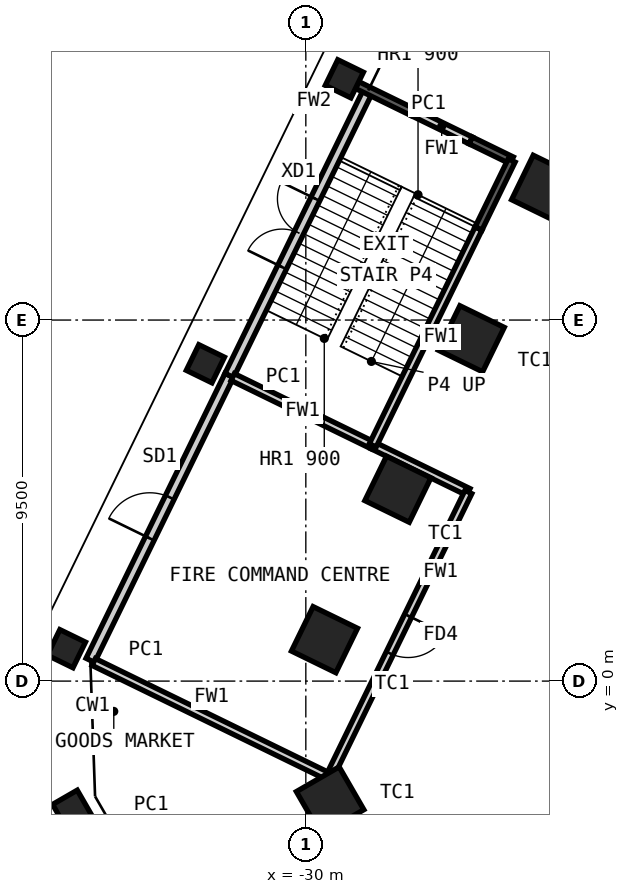
"""IFC4 building model, lengths in metres.
Left out: names, types, materials, properties, quantities, classifications, styles, units other than length and angle.
Written with IfcOpenShell. Run it as: python <this file> out.ifc"""

import sys

from ifc_helpers import new_model, si_unit, direction, frame, frame_2d, origin, origin_2d, place, context, subcontext, project, spatial, rectangle, hollow_rectangle, extrude, element, fill, save


model = new_model("IFC4")
c1 = context("Model", 3, precision=1e-05, world=origin(), true_north=direction((0.0, 1.0)))
c2 = subcontext(c1, "Body", "Model", "MODEL_VIEW")
j1 = project(units=[si_unit("LENGTHUNIT", "METRE"), si_unit("PLANEANGLEUNIT", "RADIAN")], contexts=[c1])
p1 = place(None, origin())
s1 = spatial("IfcSite", under=j1, at=p1, CompositionType="ELEMENT")
p2 = place(p1, origin())
s2 = spatial("IfcBuilding", under=s1, at=p2, CompositionType="ELEMENT")
p3 = place(p2, origin())
s3 = spatial("IfcBuildingStorey", under=s2, at=p3, CompositionType="ELEMENT", Elevation=0.0)
for number, where, z_axis, x_axis in (
    (1, (-29.361, -3.146, 0.0), (0.0, 0.0, 1.0), (0.5, -0.866, 0.0)),
    (2, (-29.509, 1.09, 0.0), (0.0, 0.0, 1.0), (-0.438, -0.899, 0.0)),
    (3, (-27.578, 5.049, 0.0), (0.0, 0.0, 1.0), (-0.438, -0.899, 0.0)),
    (4, (-25.647, 9.008, 0.0), (0.0, 0.0, 1.0), (-0.438, -0.899, 0.0)),
    (5, (-23.716, 12.966, 0.0), (0.0, 0.0, 1.0), (-0.438, -0.899, 0.0)),
):
    element("IfcColumn", number, at=place(p3, frame(where, z_axis=z_axis, x_axis=x_axis)), inside=s3, PredefinedType="COLUMN", context=c2, shape_type="SweptSolid", body=[
        extrude(hollow_rectangle(XDim=1.3, YDim=1.3, WallThickness=0.1, at=origin_2d()), origin(), (0.0, 0.0, 1.0), 6.0),
    ])
for number, where, z_axis, x_axis in (
    (6, (-36.3, 0.853, 0.0), (0.0, 0.0, 1.0), (-0.438, -0.899, 0.0)),
    (7, (-32.643, 8.35, 0.0), (0.0, 0.0, 1.0), (-0.438, -0.899, 0.0)),
    (8, (-28.986, 15.848, 0.0), (0.0, 0.0, 1.0), (-0.438, -0.899, 0.0)),
    (9, (-36.152, -3.383, 0.0), (0.0, 0.0, 1.0), (0.5, -0.866, 0.0)),
):
    element("IfcColumn", number, at=place(p3, frame(where, z_axis=z_axis, x_axis=x_axis)), inside=s3, PredefinedType="COLUMN", context=c2, shape_type="SweptSolid", body=[
        extrude(hollow_rectangle(XDim=0.75, YDim=0.75, WallThickness=0.036, at=origin_2d()), origin(), (0.0, 0.0, 1.0), 6.0),
    ])
p4 = place(p3, frame((-35.671, 0.546, 0.0), z_axis=(0.0, 0.0, 1.0), x_axis=(0.438388457998, 0.898785602852, 0.0)))
e10 = element("IfcWall", 10, at=p4, inside=s3, PredefinedType="SOLIDWALL", context=c2, shape_type="SweptSolid", body=[
    extrude(rectangle(XDim=8.342, YDim=0.25, at=frame_2d((4.171, 0.0))), origin(), (0.0, 0.0, 1.0), 5.75),
])
p5 = place(p4, frame((3.571, 0.0, 0.0)))
e11 = element("IfcOpeningElement", 11, at=p5, cuts=e10, PredefinedType="OPENING", context=c2, shape_type="SweptSolid", body=[
    extrude(rectangle(XDim=1.2, YDim=2.1, at=frame_2d((0.6, 1.05))), frame((0.0, 0.135, 0.0), z_axis=(0.0, -1.0, 0.0), x_axis=(1.0, 0.0, 0.0)), (0.0, 0.0, 1.0), 0.27),
])
p6 = place(p3, frame((-32.014, 8.043, 0.0), z_axis=(0.0, 0.0, 1.0), x_axis=(0.438364815309, 0.898797134341, 0.0)))
e12 = element("IfcWall", 12, at=p6, inside=s3, PredefinedType="SOLIDWALL", context=c2, shape_type="SweptSolid", body=[
    extrude(rectangle(XDim=8.342, YDim=0.25, at=frame_2d((4.171, 0.0))), origin(), (0.0, 0.0, 1.0), 5.75),
])
p7 = place(p6, frame((3.171, 0.0, 0.0)))
e13 = element("IfcOpeningElement", 13, at=p7, cuts=e12, PredefinedType="OPENING", context=c2, shape_type="SweptSolid", body=[
    extrude(rectangle(XDim=2.0, YDim=2.4, at=frame_2d((1.0, 1.2))), frame((0.0, 0.135, 0.0), z_axis=(0.0, -1.0, 0.0), x_axis=(1.0, 0.0, 0.0)), (0.0, 0.0, 1.0), 0.27),
])
p8 = place(p3, frame((-35.581, 0.502, 0.0), z_axis=(0.0, 0.0, 1.0), x_axis=(0.898799388667, -0.438360193142, 0.0)))
e14 = element("IfcWall", 14, at=p8, inside=s3, PredefinedType="PARTITIONING", context=c2, shape_type="SweptSolid", body=[
    extrude(rectangle(XDim=6.9, YDim=0.2, at=frame_2d((3.45, 0.0))), origin(), (0.0, 0.0, 1.0), 5.75),
])
p9 = place(p3, frame((-28.239, 6.202, 0.0), z_axis=(0.0, 0.0, 1.0), x_axis=(0.898812855928, -0.438332579235, 0.0)))
e15 = element("IfcWall", 15, at=p9, inside=s3, PredefinedType="PARTITIONING", context=c2, shape_type="SweptSolid", body=[
    extrude(rectangle(XDim=2.8, YDim=0.2, at=frame_2d((1.4, 0.0))), origin(), (0.0, 0.0, 1.0), 5.75),
])
p10 = place(p3, frame((-29.379, -2.523, 0.0), z_axis=(0.0, 0.0, 1.0), x_axis=(0.438364815309, 0.898797134341, 0.0)))
e16 = element("IfcWall", 16, at=p10, inside=s3, PredefinedType="PARTITIONING", context=c2, shape_type="SweptSolid", body=[
    extrude(rectangle(XDim=8.342, YDim=0.2, at=frame_2d((4.171, 0.0))), origin(), (0.0, 0.0, 1.0), 5.75),
])
p11 = place(p10, frame((3.621, 0.0, 0.0)))
e17 = element("IfcOpeningElement", 17, at=p11, cuts=e16, PredefinedType="OPENING", context=c2, shape_type="SweptSolid", body=[
    extrude(rectangle(XDim=1.1, YDim=2.1, at=frame_2d((0.55, 1.05))), frame((0.0, 0.11, 0.0), z_axis=(0.0, -1.0, 0.0), x_axis=(1.0, 0.0, 0.0)), (0.0, 0.0, 1.0), 0.22),
])
p12 = place(p3, frame((-31.924, 8.0, 0.0), z_axis=(0.0, 0.0, 1.0), x_axis=(0.898790191345, -0.438379050529, 0.0)))
e18 = element("IfcWall", 18, at=p12, inside=s3, PredefinedType="PARTITIONING", context=c2, shape_type="SweptSolid", body=[
    extrude(rectangle(XDim=4.1, YDim=0.2, at=frame_2d((2.05, 0.0))), origin(), (0.0, 0.0, 1.0), 5.75),
])
p13 = place(p3, frame((-28.649, 15.683, 0.0), z_axis=(0.0, 0.0, 1.0), x_axis=(0.898859390649, -0.438237145667, 0.0)))
e19 = element("IfcWall", 19, at=p13, inside=s3, PredefinedType="PARTITIONING", context=c2, shape_type="SweptSolid", body=[
    extrude(rectangle(XDim=1.625, YDim=0.2, at=frame_2d((0.812, 0.0))), origin(), (0.0, 0.0, 1.0), 5.75),
])
p14 = place(p3, frame((-28.239, 6.202, 0.0), z_axis=(0.0, 0.0, 1.0), x_axis=(0.438364548315, 0.89879726456, 0.0)))
e20 = element("IfcWall", 20, at=p14, inside=s3, PredefinedType="PARTITIONING", context=c2, shape_type="SweptSolid", body=[
    extrude(rectangle(XDim=6.35, YDim=0.2, at=frame_2d((3.175, 0.0))), origin(), (0.0, 0.0, 1.0), 5.75),
])
p15 = place(p3, frame((-27.189, 14.971, 0.0), z_axis=(0.0, 0.0, 1.0), x_axis=(0.898750501486, -0.438460415634, 0.0)))
e21 = element("IfcWall", 21, at=p15, inside=s3, PredefinedType="PARTITIONING", context=c2, shape_type="SweptSolid", body=[
    extrude(rectangle(XDim=1.7, YDim=0.2, at=frame_2d((0.85, 0.0))), origin(), (0.0, 0.0, 1.0), 5.75),
])
p16 = place(p3, frame((-25.661, 14.226, 0.0), z_axis=(0.0, 0.0, 1.0), x_axis=(0.898778221275, -0.43840359141, 0.0)))
e22 = element("IfcWall", 22, at=p16, inside=s3, PredefinedType="PARTITIONING", context=c2, shape_type="SweptSolid", body=[
    extrude(rectangle(XDim=1.2, YDim=0.2, at=frame_2d((0.6, 0.0))), origin(), (0.0, 0.0, 1.0), 5.75),
])
p17 = place(p3, frame((-25.455, 11.91, 0.0), z_axis=(0.0, 0.0, 1.0), x_axis=(0.438365666617, 0.898796719137, 0.0)))
e23 = element("IfcWall", 23, at=p17, inside=s3, PredefinedType="PARTITIONING", context=c2, shape_type="SweptSolid", body=[
    extrude(rectangle(XDim=1.992, YDim=0.2, at=frame_2d((0.996, 0.0))), origin(), (0.0, 0.0, 1.0), 5.75),
])
p18 = place(p5, origin())
e24 = element("IfcDoor", 24, at=p18, inside=s3, OperationType="SINGLE_SWING_RIGHT", PredefinedType="DOOR", context=c2, shape_type="SweptSolid", body=[
    extrude(rectangle(XDim=1.2, YDim=2.1, at=frame_2d((0.6, 1.05))), frame((0.0, 0.025, 0.0), z_axis=(0.0, -1.0, 0.0), x_axis=(1.0, 0.0, 0.0)), (0.0, 0.0, 1.0), 0.05),
])
fill(e11, e24)
p19 = place(p7, origin())
e25 = element("IfcDoor", 25, at=p19, inside=s3, OperationType="DOUBLE_DOOR_DOUBLE_SWING", PredefinedType="DOOR", context=c2, shape_type="SweptSolid", body=[
    extrude(rectangle(XDim=2.0, YDim=2.4, at=frame_2d((1.0, 1.2))), frame((0.0, 0.025, 0.0), z_axis=(0.0, -1.0, 0.0), x_axis=(1.0, 0.0, 0.0)), (0.0, 0.0, 1.0), 0.05),
])
fill(e13, e25)
p20 = place(p11, origin())
e26 = element("IfcDoor", 26, at=p20, inside=s3, OperationType="SINGLE_SWING_RIGHT", PredefinedType="DOOR", context=c2, shape_type="SweptSolid", body=[
    extrude(rectangle(XDim=1.1, YDim=2.1, at=frame_2d((0.55, 1.05))), frame((0.0, 0.025, 0.0), z_axis=(0.0, -1.0, 0.0), x_axis=(1.0, 0.0, 0.0)), (0.0, 0.0, 1.0), 0.05),
])
fill(e17, e26)
save(model, sys.argv[1])
